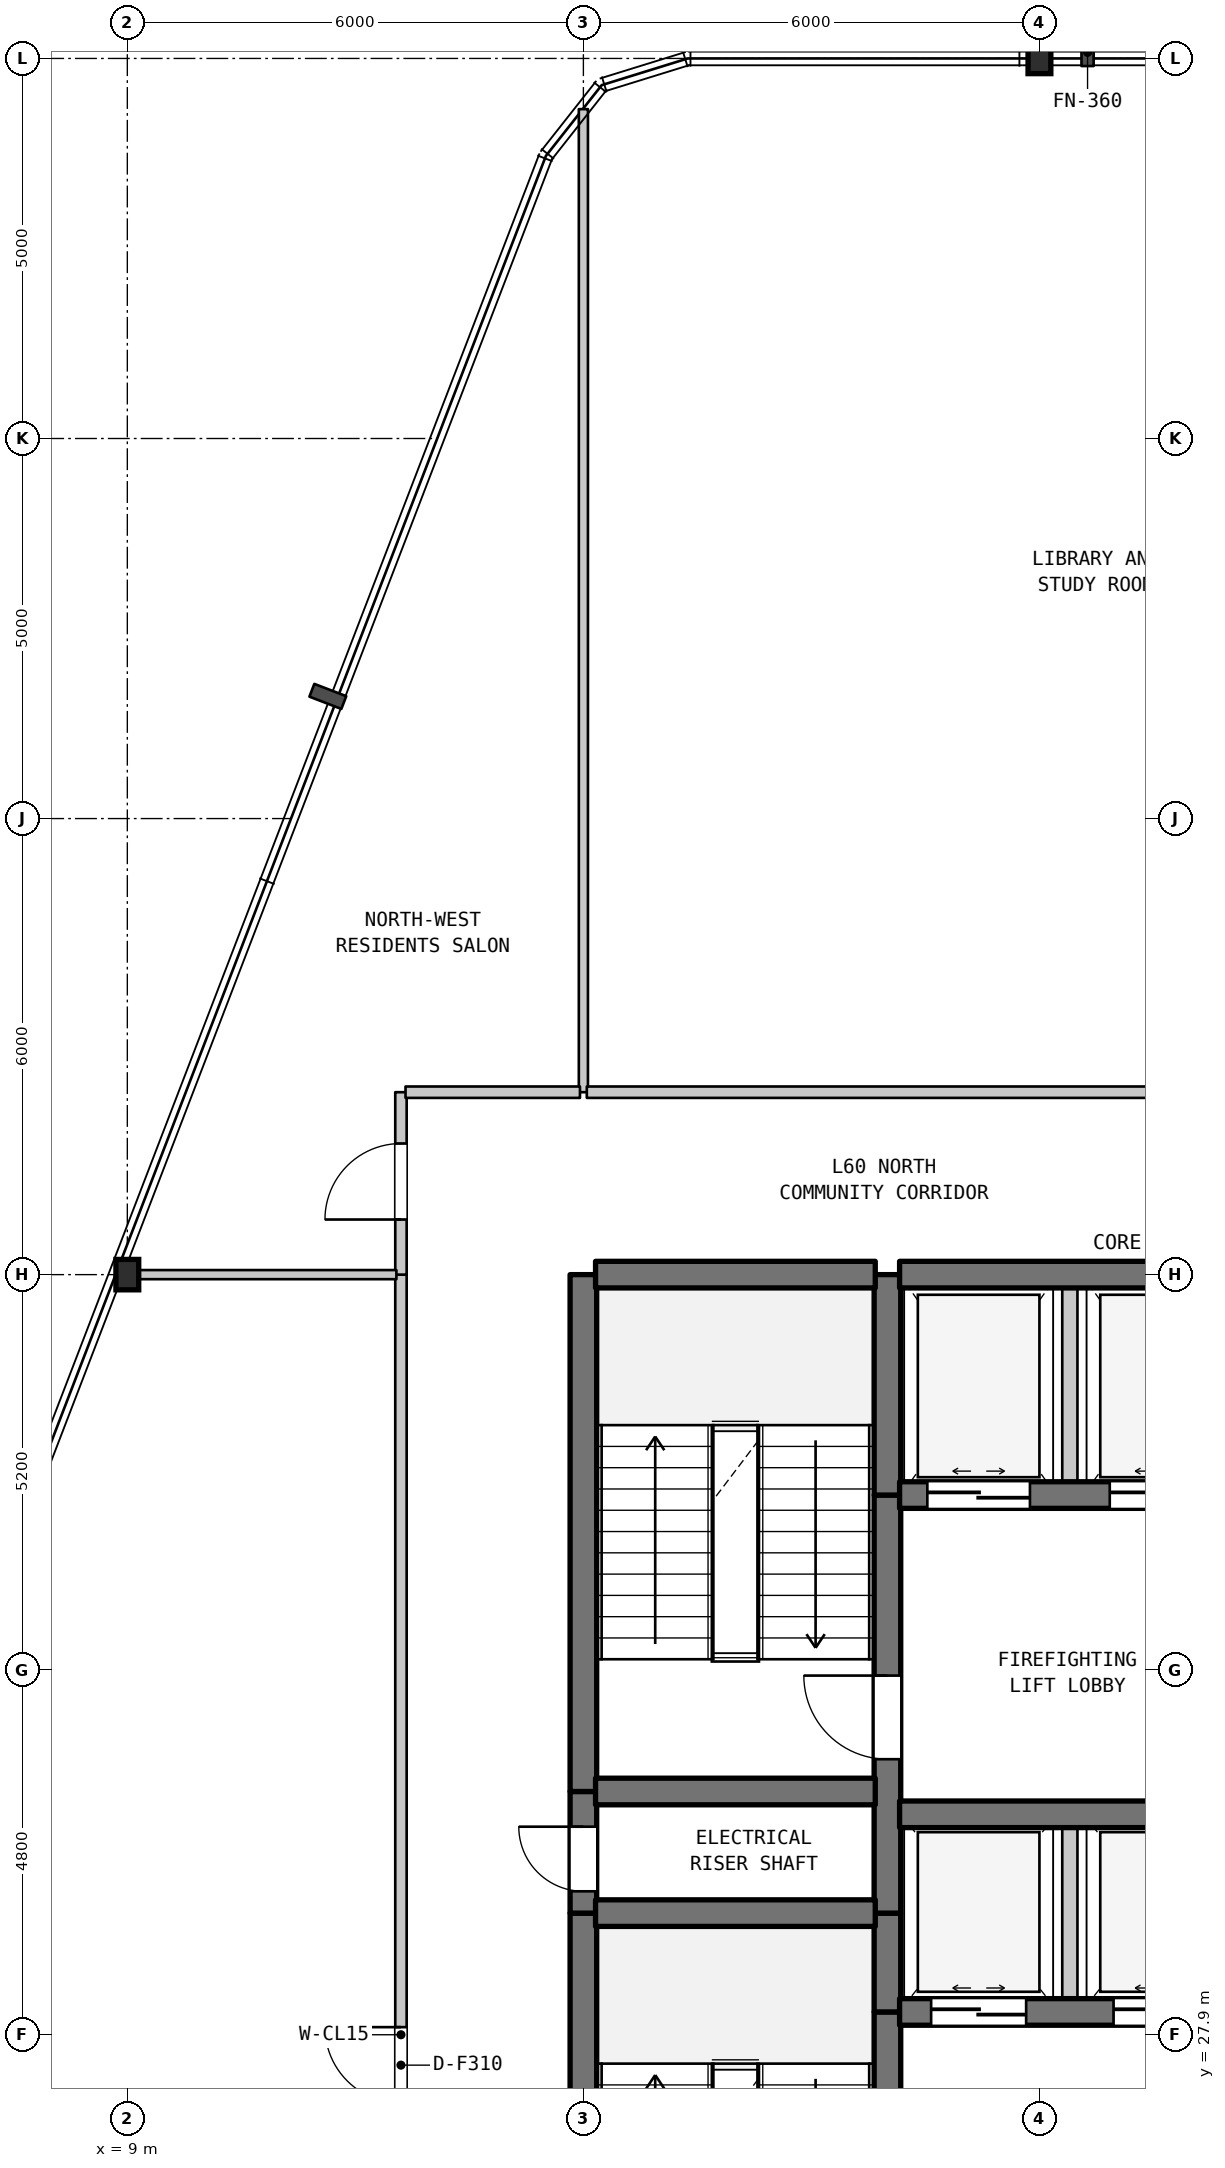
"""IFC4 building model, lengths in metres.
Left out: names, types, materials, properties, quantities, classifications, styles, units other than length and angle.
Written with IfcOpenShell. Run it as: python <this file> out.ifc"""

import sys

from ifc_helpers import new_model, si_unit, direction, frame, frame_2d, origin, origin_2d, place, context, subcontext, project, spatial, rectangle, i_section, extrude, element, fill, save


model = new_model("IFC4")
c1 = context("Model", 3, precision=1e-05, world=origin(), true_north=direction((0.0, 1.0)))
c2 = subcontext(c1, "Body", "Model", "MODEL_VIEW")
j1 = project(units=[si_unit("LENGTHUNIT", "METRE"), si_unit("PLANEANGLEUNIT", "RADIAN")], contexts=[c1])
p1 = place(None, origin())
s1 = spatial("IfcSite", under=j1, at=p1, CompositionType="ELEMENT")
p2 = place(p1, origin())
s2 = spatial("IfcBuilding", under=s1, at=p2, CompositionType="ELEMENT")
p3 = place(p2, frame((0.0, 0.0, 242.8)))
s3 = spatial("IfcBuildingStorey", under=s2, at=p3, CompositionType="ELEMENT", Elevation=242.8)
for number, where, z_axis, x_axis in (
    (1, (9.0, 37.9, 0.0), (0.0, 0.0, 1.0), (1.0, 0.0, 0.0)),
    (2, (21.0, 53.9, 0.0), (0.0, 0.0, 1.0), (1.0, 0.0, 0.0)),
):
    element("IfcColumn", number, at=place(p3, frame(where, z_axis=z_axis, x_axis=x_axis)), inside=s3, PredefinedType="COLUMN", context=c2, shape_type="SweptSolid", body=[
        extrude(i_section(OverallWidth=0.3, OverallDepth=0.4, WebThickness=0.013, FlangeThickness=0.024, FilletRadius=0.027, at=origin_2d()), origin(), (0.0, 0.0, 1.0), 4.5),
    ])
p4 = place(p3, frame((12.6, 17.9, 0.0), z_axis=(0.0, 0.0, 1.0), x_axis=(0.0, 1.0, 0.0)))
e3 = element("IfcWall", 3, at=p4, inside=s3, PredefinedType="STANDARD", context=c2, shape_type="SweptSolid", body=[
    extrude(rectangle(XDim=20.0, YDim=0.15, at=frame_2d((10.0, 0.0))), origin(), (0.0, 0.0, 1.0), 4.19),
])
p5 = place(p4, frame((9.1, 0.0, 0.0)))
e4 = element("IfcOpeningElement", 4, at=p5, cuts=e3, PredefinedType="OPENING", context=c2, shape_type="SweptSolid", body=[
    extrude(rectangle(XDim=1.0, YDim=2.15, at=frame_2d((0.5, 1.075))), frame((0.0, 0.085, 0.0), z_axis=(0.0, -1.0, 0.0), x_axis=(1.0, 0.0, 0.0)), (0.0, 0.0, 1.0), 0.17),
])
p6 = place(p3, frame((12.6, 37.9, 0.0), z_axis=(0.0, 0.0, 1.0), x_axis=(0.0, 1.0, 0.0)))
e5 = element("IfcWall", 5, at=p6, inside=s3, PredefinedType="STANDARD", context=c2, shape_type="SweptSolid", body=[
    extrude(rectangle(XDim=2.4, YDim=0.15, at=frame_2d((1.2, 0.0))), origin(), (0.0, 0.0, 1.0), 4.19),
])
p7 = place(p6, frame((0.725, 0.0, 0.0)))
e6 = element("IfcOpeningElement", 6, at=p7, cuts=e5, PredefinedType="OPENING", context=c2, shape_type="SweptSolid", body=[
    extrude(rectangle(XDim=1.0, YDim=2.15, at=frame_2d((0.5, 1.075))), frame((0.0, 0.085, 0.0), z_axis=(0.0, -1.0, 0.0), x_axis=(1.0, 0.0, 0.0)), (0.0, 0.0, 1.0), 0.17),
])
p8 = place(p3, frame((15.0, 22.7, 0.0), z_axis=(0.0, 0.0, 1.0), x_axis=(0.0, 1.0, 0.0)))
e7 = element("IfcWall", 7, at=p8, inside=s3, PredefinedType="SHEAR", context=c2, shape_type="SweptSolid", body=[
    extrude(rectangle(XDim=6.8, YDim=0.35, at=frame_2d((3.4, 0.0))), origin(), (0.0, 0.0, 1.0), 4.19),
])
p9 = place(p3, frame((15.0, 29.5, 0.0), z_axis=(0.0, 0.0, 1.0), x_axis=(0.0, 1.0, 0.0)))
e8 = element("IfcWall", 8, at=p9, inside=s3, PredefinedType="SHEAR", context=c2, shape_type="SweptSolid", body=[
    extrude(rectangle(XDim=1.6, YDim=0.35, at=frame_2d((0.8, 0.0))), origin(), (0.0, 0.0, 1.0), 4.19),
])
p10 = place(p9, frame((0.287, 0.0, 0.0)))
e9 = element("IfcOpeningElement", 9, at=p10, cuts=e8, PredefinedType="OPENING", context=c2, shape_type="SweptSolid", body=[
    extrude(rectangle(XDim=0.85, YDim=2.1, at=frame_2d((0.425, 1.05))), frame((0.0, 0.185, 0.0), z_axis=(0.0, -1.0, 0.0), x_axis=(1.0, 0.0, 0.0)), (0.0, 0.0, 1.0), 0.37),
])
p11 = place(p3, frame((15.0, 31.1, 0.0), z_axis=(0.0, 0.0, 1.0), x_axis=(0.0, 1.0, 0.0)))
e10 = element("IfcWall", 10, at=p11, inside=s3, PredefinedType="SHEAR", context=c2, shape_type="SweptSolid", body=[
    extrude(rectangle(XDim=6.8, YDim=0.35, at=frame_2d((3.4, 0.0))), origin(), (0.0, 0.0, 1.0), 4.19),
])
p12 = place(p3, frame((15.0, 40.3, 0.0), z_axis=(0.0, 0.0, 1.0), x_axis=(0.0, 1.0, 0.0)))
e11 = element("IfcWall", 11, at=p12, inside=s3, PredefinedType="PARTITIONING", context=c2, shape_type="SweptSolid", body=[
    extrude(rectangle(XDim=12.933, YDim=0.12, at=frame_2d((6.466, 0.0))), origin(), (0.0, 0.0, 1.0), 4.19),
])
p13 = place(p3, frame((19.0, 22.7, 0.0), z_axis=(0.0, 0.0, 1.0), x_axis=(0.0, 1.0, 0.0)))
e12 = element("IfcWall", 12, at=p13, inside=s3, PredefinedType="SHEAR", context=c2, shape_type="SweptSolid", body=[
    extrude(rectangle(XDim=5.5, YDim=0.35, at=frame_2d((2.75, 0.0))), origin(), (0.0, 0.0, 1.0), 4.19),
])
p14 = place(p13, frame((0.631, 0.0, 0.0)))
e13 = element("IfcOpeningElement", 13, at=p14, cuts=e12, PredefinedType="OPENING", context=c2, shape_type="SweptSolid", body=[
    extrude(rectangle(XDim=1.1, YDim=2.15, at=frame_2d((0.55, 1.075))), frame((0.0, 0.185, 0.0), z_axis=(0.0, -1.0, 0.0), x_axis=(1.0, 0.0, 0.0)), (0.0, 0.0, 1.0), 0.37),
])
p15 = place(p3, frame((19.0, 28.2, 0.0), z_axis=(0.0, 0.0, 1.0), x_axis=(0.0, 1.0, 0.0)))
e14 = element("IfcWall", 14, at=p15, inside=s3, PredefinedType="SHEAR", context=c2, shape_type="SweptSolid", body=[
    extrude(rectangle(XDim=1.3, YDim=0.35, at=frame_2d((0.65, 0.0))), origin(), (0.0, 0.0, 1.0), 4.19),
])
p16 = place(p3, frame((19.0, 29.5, 0.0), z_axis=(0.0, 0.0, 1.0), x_axis=(0.0, 1.0, 0.0)))
e15 = element("IfcWall", 15, at=p16, inside=s3, PredefinedType="SHEAR", context=c2, shape_type="SweptSolid", body=[
    extrude(rectangle(XDim=5.5, YDim=0.35, at=frame_2d((2.75, 0.0))), origin(), (0.0, 0.0, 1.0), 4.19),
])
p17 = place(p16, frame((2.025, 0.0, 0.0)))
e16 = element("IfcOpeningElement", 16, at=p17, cuts=e15, PredefinedType="OPENING", context=c2, shape_type="SweptSolid", body=[
    extrude(rectangle(XDim=1.1, YDim=2.15, at=frame_2d((0.55, 1.075))), frame((0.0, 0.185, 0.0), z_axis=(0.0, -1.0, 0.0), x_axis=(1.0, 0.0, 0.0)), (0.0, 0.0, 1.0), 0.37),
])
p18 = place(p3, frame((19.0, 35.0, 0.0), z_axis=(0.0, 0.0, 1.0), x_axis=(0.0, 1.0, 0.0)))
e17 = element("IfcWall", 17, at=p18, inside=s3, PredefinedType="SHEAR", context=c2, shape_type="SweptSolid", body=[
    extrude(rectangle(XDim=2.9, YDim=0.35, at=frame_2d((1.45, 0.0))), origin(), (0.0, 0.0, 1.0), 4.19),
])
p19 = place(p3, frame((21.4, 28.2, 0.0), z_axis=(0.0, 0.0, 1.0), x_axis=(0.0, 1.0, 0.0)))
e18 = element("IfcWall", 18, at=p19, inside=s3, PredefinedType="STANDARD", context=c2, shape_type="SweptSolid", body=[
    extrude(rectangle(XDim=2.6, YDim=0.2, at=frame_2d((1.3, 0.0))), origin(), (0.0, 0.0, 1.0), 4.19),
])
p20 = place(p3, frame((21.4, 35.0, 0.0), z_axis=(0.0, 0.0, 1.0), x_axis=(0.0, 1.0, 0.0)))
e19 = element("IfcWall", 19, at=p20, inside=s3, PredefinedType="STANDARD", context=c2, shape_type="SweptSolid", body=[
    extrude(rectangle(XDim=2.9, YDim=0.2, at=frame_2d((1.45, 0.0))), origin(), (0.0, 0.0, 1.0), 4.19),
])
p21 = place(p3, frame((19.16, 28.2, 0.0), z_axis=(0.0, 0.0, 1.0), x_axis=(1.0, 0.0, 0.0)))
e20 = element("IfcWall", 20, at=p21, inside=s3, PredefinedType="SHEAR", context=c2, shape_type="SweptSolid", body=[
    extrude(rectangle(XDim=4.48, YDim=0.35, at=frame_2d((2.24, 0.0))), origin(), (0.0, 0.0, 1.0), 4.19),
])
p22 = place(p21, frame((0.415, 0.0, 0.0)))
e21 = element("IfcOpeningElement", 21, at=p22, cuts=e20, PredefinedType="OPENING", context=c2, shape_type="SweptSolid", body=[
    extrude(rectangle(XDim=1.25, YDim=2.2, at=frame_2d((0.625, 1.1))), frame((0.0, 0.185, 0.0), z_axis=(0.0, -1.0, 0.0), x_axis=(1.0, 0.0, 0.0)), (0.0, 0.0, 1.0), 0.37),
])
p23 = place(p21, frame((2.815, 0.0, 0.0)))
e22 = element("IfcOpeningElement", 22, at=p23, cuts=e20, PredefinedType="OPENING", context=c2, shape_type="SweptSolid", body=[
    extrude(rectangle(XDim=1.25, YDim=2.2, at=frame_2d((0.625, 1.1))), frame((0.0, 0.185, 0.0), z_axis=(0.0, -1.0, 0.0), x_axis=(1.0, 0.0, 0.0)), (0.0, 0.0, 1.0), 0.37),
])
p24 = place(p3, frame((15.16, 29.5, 0.0), z_axis=(0.0, 0.0, 1.0), x_axis=(1.0, 0.0, 0.0)))
e23 = element("IfcWall", 23, at=p24, inside=s3, PredefinedType="SHEAR", context=c2, shape_type="SweptSolid", body=[
    extrude(rectangle(XDim=3.68, YDim=0.35, at=frame_2d((1.84, 0.0))), origin(), (0.0, 0.0, 1.0), 4.19),
])
p25 = place(p3, frame((19.16, 30.8, 0.0), z_axis=(0.0, 0.0, 1.0), x_axis=(1.0, 0.0, 0.0)))
e24 = element("IfcWall", 24, at=p25, inside=s3, PredefinedType="SHEAR", context=c2, shape_type="SweptSolid", body=[
    extrude(rectangle(XDim=4.48, YDim=0.35, at=frame_2d((2.24, 0.0))), origin(), (0.0, 0.0, 1.0), 4.19),
])
p26 = place(p3, frame((15.16, 31.1, 0.0), z_axis=(0.0, 0.0, 1.0), x_axis=(1.0, 0.0, 0.0)))
e25 = element("IfcWall", 25, at=p26, inside=s3, PredefinedType="SHEAR", context=c2, shape_type="SweptSolid", body=[
    extrude(rectangle(XDim=3.68, YDim=0.35, at=frame_2d((1.84, 0.0))), origin(), (0.0, 0.0, 1.0), 4.19),
])
p27 = place(p3, frame((19.16, 35.0, 0.0), z_axis=(0.0, 0.0, 1.0), x_axis=(1.0, 0.0, 0.0)))
e26 = element("IfcWall", 26, at=p27, inside=s3, PredefinedType="SHEAR", context=c2, shape_type="SweptSolid", body=[
    extrude(rectangle(XDim=4.48, YDim=0.35, at=frame_2d((2.24, 0.0))), origin(), (0.0, 0.0, 1.0), 4.19),
])
p28 = place(p27, frame((0.365, 0.0, 0.0)))
e27 = element("IfcOpeningElement", 27, at=p28, cuts=e26, PredefinedType="OPENING", context=c2, shape_type="SweptSolid", body=[
    extrude(rectangle(XDim=1.35, YDim=2.2, at=frame_2d((0.675, 1.1))), frame((0.0, 0.185, 0.0), z_axis=(0.0, -1.0, 0.0), x_axis=(1.0, 0.0, 0.0)), (0.0, 0.0, 1.0), 0.37),
])
p29 = place(p27, frame((2.765, 0.0, 0.0)))
e28 = element("IfcOpeningElement", 28, at=p29, cuts=e26, PredefinedType="OPENING", context=c2, shape_type="SweptSolid", body=[
    extrude(rectangle(XDim=1.35, YDim=2.2, at=frame_2d((0.675, 1.1))), frame((0.0, 0.185, 0.0), z_axis=(0.0, -1.0, 0.0), x_axis=(1.0, 0.0, 0.0)), (0.0, 0.0, 1.0), 0.37),
])
p30 = place(p3, frame((8.856, 37.9, 0.0), z_axis=(0.0, 0.0, 1.0), x_axis=(1.0, 0.0, 0.0)))
e29 = element("IfcWall", 29, at=p30, inside=s3, PredefinedType="PARTITIONING", context=c2, shape_type="SweptSolid", body=[
    extrude(rectangle(XDim=3.684, YDim=0.12, at=frame_2d((1.842, 0.0))), origin(), (0.0, 0.0, 1.0), 3.84),
])
p31 = place(p3, frame((15.16, 37.9, 0.0), z_axis=(0.0, 0.0, 1.0), x_axis=(1.0, 0.0, 0.0)))
e30 = element("IfcWall", 30, at=p31, inside=s3, PredefinedType="SHEAR", context=c2, shape_type="SweptSolid", body=[
    extrude(rectangle(XDim=3.68, YDim=0.35, at=frame_2d((1.84, 0.0))), origin(), (0.0, 0.0, 1.0), 4.19),
])
p32 = place(p3, frame((19.16, 37.9, 0.0), z_axis=(0.0, 0.0, 1.0), x_axis=(1.0, 0.0, 0.0)))
e31 = element("IfcWall", 31, at=p32, inside=s3, PredefinedType="SHEAR", context=c2, shape_type="SweptSolid", body=[
    extrude(rectangle(XDim=4.48, YDim=0.35, at=frame_2d((2.24, 0.0))), origin(), (0.0, 0.0, 1.0), 4.19),
])
p33 = place(p3, frame((12.66, 40.3, 0.0), z_axis=(0.0, 0.0, 1.0), x_axis=(1.0, 0.0, 0.0)))
e32 = element("IfcWall", 32, at=p33, inside=s3, PredefinedType="STANDARD", context=c2, shape_type="SweptSolid", body=[
    extrude(rectangle(XDim=2.295, YDim=0.15, at=frame_2d((1.147, 0.0))), origin(), (0.0, 0.0, 1.0), 4.19),
])
p34 = place(p3, frame((15.045, 40.3, 0.0), z_axis=(0.0, 0.0, 1.0), x_axis=(1.0, 0.0, 0.0)))
e33 = element("IfcWall", 33, at=p34, inside=s3, PredefinedType="STANDARD", context=c2, shape_type="SweptSolid", body=[
    extrude(rectangle(XDim=17.895, YDim=0.15, at=frame_2d((8.948, 0.0))), origin(), (0.0, 0.0, 1.0), 4.19),
])
p35 = place(p34, frame((9.205, 0.0, 0.0)))
e34 = element("IfcOpeningElement", 34, at=p35, cuts=e33, PredefinedType="OPENING", context=c2, shape_type="SweptSolid", body=[
    extrude(rectangle(XDim=1.0, YDim=2.15, at=frame_2d((0.5, 1.075))), frame((0.0, 0.085, 0.0), z_axis=(0.0, -1.0, 0.0), x_axis=(1.0, 0.0, 0.0)), (0.0, 0.0, 1.0), 0.17),
])
p36 = place(p5, origin())
e35 = element("IfcDoor", 35, at=p36, inside=s3, OperationType="SINGLE_SWING_RIGHT", PredefinedType="DOOR", context=c2, shape_type="SweptSolid", body=[
    extrude(rectangle(XDim=1.0, YDim=2.15, at=frame_2d((0.5, 1.075))), frame((0.0, 0.025, 0.0), z_axis=(0.0, -1.0, 0.0), x_axis=(1.0, 0.0, 0.0)), (0.0, 0.0, 1.0), 0.05),
])
fill(e4, e35)
p37 = place(p7, origin())
e36 = element("IfcDoor", 36, at=p37, inside=s3, OperationType="SINGLE_SWING_LEFT", PredefinedType="DOOR", context=c2, shape_type="SweptSolid", body=[
    extrude(rectangle(XDim=1.0, YDim=2.15, at=frame_2d((0.5, 1.075))), frame((0.0, 0.025, 0.0), z_axis=(0.0, -1.0, 0.0), x_axis=(1.0, 0.0, 0.0)), (0.0, 0.0, 1.0), 0.05),
])
fill(e6, e36)
p38 = place(p10, origin())
e37 = element("IfcDoor", 37, at=p38, inside=s3, OperationType="SINGLE_SWING_RIGHT", PredefinedType="DOOR", context=c2, shape_type="SweptSolid", body=[
    extrude(rectangle(XDim=0.85, YDim=2.1, at=frame_2d((0.425, 1.05))), frame((0.0, 0.025, 0.0), z_axis=(0.0, -1.0, 0.0), x_axis=(1.0, 0.0, 0.0)), (0.0, 0.0, 1.0), 0.05),
])
fill(e9, e37)
p39 = place(p17, origin())
e38 = element("IfcDoor", 38, at=p39, inside=s3, OperationType="SINGLE_SWING_RIGHT", PredefinedType="DOOR", context=c2, shape_type="SweptSolid", body=[
    extrude(rectangle(XDim=1.1, YDim=2.15, at=frame_2d((0.55, 1.075))), frame((0.0, 0.025, 0.0), z_axis=(0.0, -1.0, 0.0), x_axis=(1.0, 0.0, 0.0)), (0.0, 0.0, 1.0), 0.05),
])
fill(e16, e38)
p40 = place(p22, origin())
e39 = element("IfcDoor", 39, at=p40, inside=s3, OperationType="DOUBLE_DOOR_SLIDING", PredefinedType="DOOR", context=c2, shape_type="SweptSolid", body=[
    extrude(rectangle(XDim=1.25, YDim=2.2, at=frame_2d((0.625, 1.1))), frame((0.0, 0.025, 0.0), z_axis=(0.0, -1.0, 0.0), x_axis=(1.0, 0.0, 0.0)), (0.0, 0.0, 1.0), 0.05),
])
fill(e21, e39)
p41 = place(p23, origin())
e40 = element("IfcDoor", 40, at=p41, inside=s3, OperationType="DOUBLE_DOOR_SLIDING", PredefinedType="DOOR", context=c2, shape_type="SweptSolid", body=[
    extrude(rectangle(XDim=1.25, YDim=2.2, at=frame_2d((0.625, 1.1))), frame((0.0, 0.025, 0.0), z_axis=(0.0, -1.0, 0.0), x_axis=(1.0, 0.0, 0.0)), (0.0, 0.0, 1.0), 0.05),
])
fill(e22, e40)
p42 = place(p28, origin())
e41 = element("IfcDoor", 41, at=p42, inside=s3, OperationType="DOUBLE_DOOR_SLIDING", PredefinedType="DOOR", context=c2, shape_type="SweptSolid", body=[
    extrude(rectangle(XDim=1.35, YDim=2.2, at=frame_2d((0.675, 1.1))), frame((0.0, 0.025, 0.0), z_axis=(0.0, -1.0, 0.0), x_axis=(1.0, 0.0, 0.0)), (0.0, 0.0, 1.0), 0.05),
])
fill(e27, e41)
p43 = place(p29, origin())
e42 = element("IfcDoor", 42, at=p43, inside=s3, OperationType="DOUBLE_DOOR_SLIDING", PredefinedType="DOOR", context=c2, shape_type="SweptSolid", body=[
    extrude(rectangle(XDim=1.35, YDim=2.2, at=frame_2d((0.675, 1.1))), frame((0.0, 0.025, 0.0), z_axis=(0.0, -1.0, 0.0), x_axis=(1.0, 0.0, 0.0)), (0.0, 0.0, 1.0), 0.05),
])
fill(e28, e42)
save(model, sys.argv[1])
